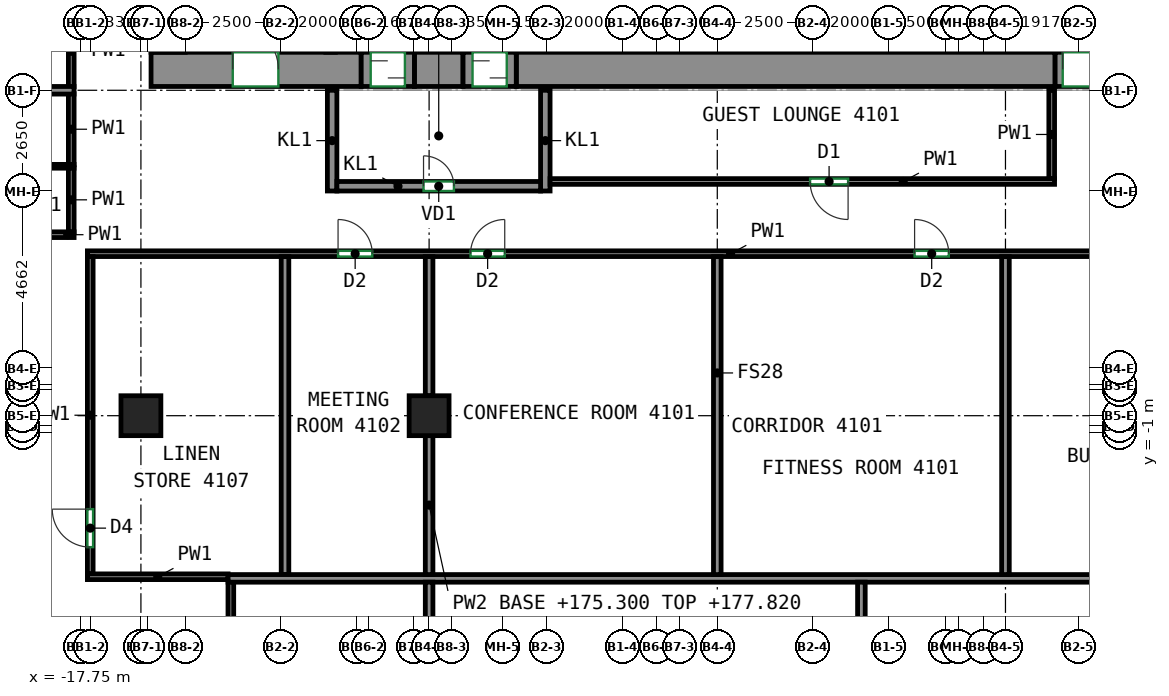
"""IFC4 building model, lengths in metres.
Left out: names, types, materials, properties, quantities, classifications, styles, units other than length and angle.
Written with IfcOpenShell. Run it as: python <this file> out.ifc"""

import sys

from ifc_helpers import new_model, si_unit, direction, frame, frame_2d, origin, origin_2d, place, context, subcontext, project, spatial, rectangle, extrude, source, transform, mapped, element, fill, save


model = new_model("IFC4")
c1 = context("Model", 3, precision=1e-05, world=origin(), true_north=direction((0.0, 1.0)))
c2 = subcontext(c1, "Body", "Model", "MODEL_VIEW")
j1 = project(units=[si_unit("LENGTHUNIT", "METRE"), si_unit("PLANEANGLEUNIT", "RADIAN")], contexts=[c1])
p1 = place(None, origin())
s1 = spatial("IfcSite", under=j1, at=p1, CompositionType="ELEMENT")
p2 = place(p1, origin())
s2 = spatial("IfcBuilding", under=s1, at=p2, CompositionType="ELEMENT")
p3 = place(p2, frame((0.0, 0.0, 175.3)))
s3 = spatial("IfcBuildingStorey", under=s2, at=p3, CompositionType="ELEMENT", Elevation=175.3)
m1 = source(origin(), c2, "Body", "SweptSolid", [
    extrude(rectangle(XDim=1.05, YDim=1.05, at=origin_2d()), origin(), (0.0, 0.0, 1.0), 3.12),
])
for number, where, z_axis, x_axis in (
    (1, (-16.167, -0.562, 0.0), (0.0, 0.0, 1.0), (1.0, 0.0, 0.0)),
    (2, (-8.583, -0.562, 0.0), (0.0, 0.0, 1.0), (1.0, 0.0, 0.0)),
):
    element("IfcColumn", number, at=place(p3, frame(where, z_axis=z_axis, x_axis=x_axis)), inside=s3, PredefinedType="COLUMN", context=c2, shape_type="MappedRepresentation", body=[
        mapped(m1, transform((0.0, 0.0, 0.0))),
    ])
m2 = source(origin(), c2, "Body", "SweptSolid", [
    extrude(rectangle(XDim=5.53, YDim=0.9, at=frame_2d((2.765, 0.0))), origin(), (0.0, 0.0, 1.0), 3.12),
])
p4 = place(p3, frame((-15.9, 8.55, 0.0), z_axis=(0.0, 0.0, 1.0), x_axis=(1.0, 0.0, 0.0)))
e3 = element("IfcWall", 3, at=p4, inside=s3, PredefinedType="SHEAR", context=c2, shape_type="MappedRepresentation", body=[
    mapped(m2, transform((0.0, 0.0, 0.0))),
])
p5 = place(p4, frame((2.15, 0.0, 0.0)))
e4 = element("IfcOpeningElement", 4, at=p5, cuts=e3, PredefinedType="OPENING", context=c2, shape_type="SweptSolid", body=[
    extrude(rectangle(XDim=1.2, YDim=2.1, at=frame_2d((0.6, 1.05))), frame((0.0, 0.46, 0.0), z_axis=(0.0, -1.0, 0.0), x_axis=(1.0, 0.0, 0.0)), (0.0, 0.0, 1.0), 0.92),
])
m3 = source(origin(), c2, "Body", "SweptSolid", [
    extrude(rectangle(XDim=1.28, YDim=0.9, at=frame_2d((0.64, 0.0))), origin(), (0.0, 0.0, 1.0), 3.12),
])
p6 = place(p3, frame((-8.97, 8.55, 0.0), z_axis=(0.0, 0.0, 1.0), x_axis=(1.0, 0.0, 0.0)))
e5 = element("IfcWall", 5, at=p6, inside=s3, PredefinedType="SHEAR", context=c2, shape_type="MappedRepresentation", body=[
    mapped(m3, transform((0.0, 0.0, 0.0))),
])
m4 = source(origin(), c2, "Body", "SweptSolid", [
    extrude(rectangle(XDim=14.18, YDim=0.9, at=frame_2d((7.09, 0.0))), origin(), (0.0, 0.0, 1.0), 3.12),
])
p7 = place(p3, frame((-6.29, 8.55, 0.0), z_axis=(0.0, 0.0, 1.0), x_axis=(1.0, 0.0, 0.0)))
e6 = element("IfcWall", 6, at=p7, inside=s3, PredefinedType="SHEAR", context=c2, shape_type="MappedRepresentation", body=[
    mapped(m4, transform((0.0, 0.0, 0.0))),
])
m5 = source(origin(), c2, "Body", "SweptSolid", [
    extrude(rectangle(XDim=2.65, YDim=0.25, at=frame_2d((1.325, 0.0))), origin(), (0.0, 0.0, 1.0), 3.12),
])
for number, where, z_axis, x_axis in (
    (7, (-11.135, 5.35, 0.0), (0.0, 0.0, 1.0), (0.0, 1.0, 0.0)),
    (8, (-5.525, 5.35, 0.0), (0.0, 0.0, 1.0), (0.0, 1.0, 0.0)),
):
    element("IfcWall", number, at=place(p3, frame(where, z_axis=z_axis, x_axis=x_axis)), inside=s3, PredefinedType="PARTITIONING", context=c2, shape_type="MappedRepresentation", body=[
        mapped(m5, transform((0.0, 0.0, 0.0))),
    ])
m6 = source(origin(), c2, "Body", "SweptSolid", [
    extrude(rectangle(XDim=5.36, YDim=0.25, at=frame_2d((2.68, 0.0))), origin(), (0.0, 0.0, 1.0), 3.12),
])
p8 = place(p3, frame((-11.01, 5.475, 0.0), z_axis=(0.0, 0.0, 1.0), x_axis=(1.0, 0.0, 0.0)))
e9 = element("IfcWall", 9, at=p8, inside=s3, PredefinedType="PARTITIONING", context=c2, shape_type="MappedRepresentation", body=[
    mapped(m6, transform((0.0, 0.0, 0.0))),
])
p9 = place(p8, frame((2.28, 0.0, 0.0)))
e10 = element("IfcOpeningElement", 10, at=p9, cuts=e9, PredefinedType="OPENING", context=c2, shape_type="SweptSolid", body=[
    extrude(rectangle(XDim=0.8, YDim=2.0, at=frame_2d((0.4, 1.0))), frame((0.0, 0.135, 0.0), z_axis=(0.0, -1.0, 0.0), x_axis=(1.0, 0.0, 0.0)), (0.0, 0.0, 1.0), 0.27),
])
m7 = source(origin(), c2, "Body", "SweptSolid", [
    extrude(rectangle(XDim=1.4, YDim=0.9, at=frame_2d((0.7, 0.0))), origin(), (0.0, 0.0, 1.0), 2.7),
])
p10 = place(p3, frame((-10.37, 8.55, 0.0), z_axis=(0.0, 0.0, 1.0), x_axis=(1.0, 0.0, 0.0)))
e11 = element("IfcWall", 11, at=p10, inside=s3, PredefinedType="PARTITIONING", context=c2, shape_type="MappedRepresentation", body=[
    mapped(m7, transform((0.0, 0.0, 0.0))),
])
p11 = place(p10, frame((0.25, 0.0, 0.0)))
e12 = element("IfcOpeningElement", 12, at=p11, cuts=e11, PredefinedType="OPENING", context=c2, shape_type="SweptSolid", body=[
    extrude(rectangle(XDim=0.9, YDim=2.1, at=frame_2d((0.45, 1.05))), frame((0.0, 0.46, 0.0), z_axis=(0.0, -1.0, 0.0), x_axis=(1.0, 0.0, 0.0)), (0.0, 0.0, 1.0), 0.92),
])
m8 = source(origin(), c2, "Body", "SweptSolid", [
    extrude(rectangle(XDim=1.4, YDim=0.9, at=frame_2d((0.7, 0.0))), origin(), (0.0, 0.0, 1.0), 2.7),
])
p12 = place(p3, frame((-7.69, 8.55, 0.0), z_axis=(0.0, 0.0, 1.0), x_axis=(1.0, 0.0, 0.0)))
e13 = element("IfcWall", 13, at=p12, inside=s3, PredefinedType="PARTITIONING", context=c2, shape_type="MappedRepresentation", body=[
    mapped(m8, transform((0.0, 0.0, 0.0))),
])
p13 = place(p12, frame((0.25, 0.0, 0.0)))
e14 = element("IfcOpeningElement", 14, at=p13, cuts=e13, PredefinedType="OPENING", context=c2, shape_type="SweptSolid", body=[
    extrude(rectangle(XDim=0.9, YDim=2.1, at=frame_2d((0.45, 1.05))), frame((0.0, 0.46, 0.0), z_axis=(0.0, -1.0, 0.0), x_axis=(1.0, 0.0, 0.0)), (0.0, 0.0, 1.0), 0.92),
])
m9 = source(origin(), c2, "Body", "SweptSolid", [
    extrude(rectangle(XDim=2.4, YDim=0.9, at=frame_2d((1.2, 0.0))), origin(), (0.0, 0.0, 1.0), 2.7),
])
p14 = place(p3, frame((7.89, 8.55, 0.0), z_axis=(0.0, 0.0, 1.0), x_axis=(1.0, 0.0, 0.0)))
e15 = element("IfcWall", 15, at=p14, inside=s3, PredefinedType="PARTITIONING", context=c2, shape_type="MappedRepresentation", body=[
    mapped(m9, transform((0.0, 0.0, 0.0))),
])
p15 = place(p14, frame((0.2, 0.0, 0.0)))
e16 = element("IfcOpeningElement", 16, at=p15, cuts=e15, PredefinedType="OPENING", context=c2, shape_type="SweptSolid", body=[
    extrude(rectangle(XDim=2.0, YDim=2.1, at=frame_2d((1.0, 1.05))), frame((0.0, 0.46, 0.0), z_axis=(0.0, -1.0, 0.0), x_axis=(1.0, 0.0, 0.0)), (0.0, 0.0, 1.0), 0.92),
])
p16 = place(p3, frame((-17.925, 4.2, 0.0), z_axis=(0.0, 0.0, 1.0), x_axis=(-1.0, 0.0, 0.0)))
e17 = element("IfcWall", 17, at=p16, inside=s3, PredefinedType="PARTITIONING", context=c2, shape_type="SweptSolid", body=[
    extrude(rectangle(XDim=2.109, YDim=0.15, at=frame_2d((1.054, 0.0))), origin(), (0.0, 0.0, 1.0), 3.12),
])
p17 = place(p16, frame((0.706, 0.0, 0.0)))
e18 = element("IfcOpeningElement", 18, at=p17, cuts=e17, PredefinedType="OPENING", context=c2, shape_type="SweptSolid", body=[
    extrude(rectangle(XDim=1.0, YDim=2.1, at=frame_2d((0.5, 1.05))), frame((0.0, 0.085, 0.0), z_axis=(0.0, -1.0, 0.0), x_axis=(1.0, 0.0, 0.0)), (0.0, 0.0, 1.0), 0.17),
])
p18 = place(p3, frame((-18.0, 4.275, 0.0), z_axis=(0.0, 0.0, 1.0), x_axis=(0.0, 1.0, 0.0)))
e19 = element("IfcWall", 19, at=p18, inside=s3, PredefinedType="PARTITIONING", context=c2, shape_type="SweptSolid", body=[
    extrude(rectangle(XDim=1.685, YDim=0.15, at=frame_2d((0.843, 0.0))), origin(), (0.0, 0.0, 1.0), 3.12),
])
for number, where, z_axis, x_axis in (
    (20, (-18.0, 6.04, 0.0), (0.0, 0.0, 1.0), (0.0, 1.0, 0.0)),
    (21, (-18.0, 8.09, 0.0), (0.0, 0.0, 1.0), (0.0, 1.0, 0.0)),
):
    element("IfcWall", number, at=place(p3, frame(where, z_axis=z_axis, x_axis=x_axis)), inside=s3, PredefinedType="PARTITIONING", context=c2, shape_type="SweptSolid", body=[
        extrude(rectangle(XDim=1.87, YDim=0.15, at=frame_2d((0.935, 0.0))), origin(), (0.0, 0.0, 1.0), 3.12),
    ])
p19 = place(p3, frame((7.875, 5.6, 0.0), z_axis=(0.0, 0.0, 1.0), x_axis=(-1.0, 0.0, 0.0)))
e22 = element("IfcWall", 22, at=p19, inside=s3, PredefinedType="PARTITIONING", context=c2, shape_type="SweptSolid", body=[
    extrude(rectangle(XDim=13.275, YDim=0.15, at=frame_2d((6.637, 0.0))), origin(), (0.0, 0.0, 1.0), 3.12),
])
p20 = place(p19, frame((5.433, 0.0, 0.0)))
e23 = element("IfcOpeningElement", 23, at=p20, cuts=e22, PredefinedType="OPENING", context=c2, shape_type="SweptSolid", body=[
    extrude(rectangle(XDim=1.0, YDim=2.1, at=frame_2d((0.5, 1.05))), frame((0.0, 0.085, 0.0), z_axis=(0.0, -1.0, 0.0), x_axis=(1.0, 0.0, 0.0)), (0.0, 0.0, 1.0), 0.17),
])
p21 = place(p3, frame((7.8, 8.0, 0.0), z_axis=(0.0, 0.0, 1.0), x_axis=(0.0, -1.0, 0.0)))
e24 = element("IfcWall", 24, at=p21, inside=s3, PredefinedType="PARTITIONING", context=c2, shape_type="SweptSolid", body=[
    extrude(rectangle(XDim=2.325, YDim=0.15, at=frame_2d((1.163, 0.0))), origin(), (0.0, 0.0, 1.0), 3.12),
])
p22 = place(p3, frame((-17.575, 3.7, 0.0), z_axis=(0.0, 0.0, 1.0), x_axis=(1.0, 0.0, 0.0)))
e25 = element("IfcWall", 25, at=p22, inside=s3, PredefinedType="PARTITIONING", context=c2, shape_type="SweptSolid", body=[
    extrude(rectangle(XDim=33.85, YDim=0.15, at=frame_2d((16.925, 0.0))), origin(), (0.0, 0.0, 1.0), 3.12),
])
p23 = place(p22, frame((6.596, 0.0, 0.0)))
e26 = element("IfcOpeningElement", 26, at=p23, cuts=e25, PredefinedType="OPENING", context=c2, shape_type="SweptSolid", body=[
    extrude(rectangle(XDim=0.9, YDim=2.1, at=frame_2d((0.45, 1.05))), frame((0.0, 0.085, 0.0), z_axis=(0.0, -1.0, 0.0), x_axis=(1.0, 0.0, 0.0)), (0.0, 0.0, 1.0), 0.17),
])
p24 = place(p22, frame((10.082, 0.0, 0.0)))
e27 = element("IfcOpeningElement", 27, at=p24, cuts=e25, PredefinedType="OPENING", context=c2, shape_type="SweptSolid", body=[
    extrude(rectangle(XDim=0.9, YDim=2.1, at=frame_2d((0.45, 1.05))), frame((0.0, 0.085, 0.0), z_axis=(0.0, -1.0, 0.0), x_axis=(1.0, 0.0, 0.0)), (0.0, 0.0, 1.0), 0.17),
])
p25 = place(p22, frame((21.767, 0.0, 0.0)))
e28 = element("IfcOpeningElement", 28, at=p25, cuts=e25, PredefinedType="OPENING", context=c2, shape_type="SweptSolid", body=[
    extrude(rectangle(XDim=0.9, YDim=2.1, at=frame_2d((0.45, 1.05))), frame((0.0, 0.085, 0.0), z_axis=(0.0, -1.0, 0.0), x_axis=(1.0, 0.0, 0.0)), (0.0, 0.0, 1.0), 0.17),
])
p26 = place(p22, frame((29.649, 0.0, 0.0)))
e29 = element("IfcOpeningElement", 29, at=p26, cuts=e25, PredefinedType="OPENING", context=c2, shape_type="SweptSolid", body=[
    extrude(rectangle(XDim=0.9, YDim=2.1, at=frame_2d((0.45, 1.05))), frame((0.0, 0.085, 0.0), z_axis=(0.0, -1.0, 0.0), x_axis=(1.0, 0.0, 0.0)), (0.0, 0.0, 1.0), 0.17),
])
p27 = place(p3, frame((-17.5, -4.725, 0.0), z_axis=(0.0, 0.0, 1.0), x_axis=(0.0, 1.0, 0.0)))
e30 = element("IfcWall", 30, at=p27, inside=s3, PredefinedType="PARTITIONING", context=c2, shape_type="SweptSolid", body=[
    extrude(rectangle(XDim=8.35, YDim=0.15, at=frame_2d((4.175, 0.0))), origin(), (0.0, 0.0, 1.0), 3.12),
])
p28 = place(p27, frame((0.704, 0.0, 0.0)))
e31 = element("IfcOpeningElement", 31, at=p28, cuts=e30, PredefinedType="OPENING", context=c2, shape_type="SweptSolid", body=[
    extrude(rectangle(XDim=1.0, YDim=2.1, at=frame_2d((0.5, 1.05))), frame((0.0, 0.085, 0.0), z_axis=(0.0, -1.0, 0.0), x_axis=(1.0, 0.0, 0.0)), (0.0, 0.0, 1.0), 0.17),
])
p29 = place(p3, frame((-17.575, -4.8, 0.0), z_axis=(0.0, 0.0, 1.0), x_axis=(1.0, 0.0, 0.0)))
e32 = element("IfcWall", 32, at=p29, inside=s3, PredefinedType="PARTITIONING", context=c2, shape_type="SweptSolid", body=[
    extrude(rectangle(XDim=3.702, YDim=0.15, at=frame_2d((1.851, 0.0))), origin(), (0.0, 0.0, 1.0), 3.12),
])
p30 = place(p3, frame((-13.8, -7.75, 0.0), z_axis=(0.0, 0.0, 1.0), x_axis=(0.0, 1.0, 0.0)))
e33 = element("IfcWall", 33, at=p30, inside=s3, PredefinedType="PARTITIONING", context=c2, shape_type="SweptSolid", body=[
    extrude(rectangle(XDim=2.817, YDim=0.15, at=frame_2d((1.408, 0.0))), origin(), (0.0, 0.0, 1.0), 3.12),
])
p31 = place(p3, frame((-17.927, 6.0, 0.0), z_axis=(0.0, 0.0, 1.0), x_axis=(-1.0, 0.0, 0.0)))
e34 = element("IfcWall", 34, at=p31, inside=s3, PredefinedType="PARTITIONING", context=c2, shape_type="SweptSolid", body=[
    extrude(rectangle(XDim=2.825, YDim=0.1, at=frame_2d((1.413, 0.0))), origin(), (0.0, 0.0, 1.0), 3.12),
])
p32 = place(p31, frame((1.522, 0.0, 0.0)))
e35 = element("IfcOpeningElement", 35, at=p32, cuts=e34, PredefinedType="OPENING", context=c2, shape_type="SweptSolid", body=[
    extrude(rectangle(XDim=0.9, YDim=2.1, at=frame_2d((0.45, 1.05))), frame((0.0, 0.06, 0.0), z_axis=(0.0, -1.0, 0.0), x_axis=(1.0, 0.0, 0.0)), (0.0, 0.0, 1.0), 0.12),
])
p33 = place(p3, frame((-26.4, 8.0, 0.0), z_axis=(0.0, 0.0, 1.0), x_axis=(1.0, 0.0, 0.0)))
e36 = element("IfcWall", 36, at=p33, inside=s3, PredefinedType="PARTITIONING", context=c2, shape_type="SweptSolid", body=[
    extrude(rectangle(XDim=8.473, YDim=0.2, at=frame_2d((4.236, 0.0))), origin(), (0.0, 0.0, 1.0), 3.12),
])
p34 = place(p3, frame((-12.375, -4.743, 0.0), z_axis=(0.0, 0.0, 1.0), x_axis=(0.0, 1.0, 0.0)))
e37 = element("IfcWall", 37, at=p34, inside=s3, PredefinedType="PARTITIONING", context=c2, shape_type="SweptSolid", body=[
    extrude(rectangle(XDim=8.366, YDim=0.2, at=frame_2d((4.183, 0.0))), origin(), (0.0, 0.0, 1.0), 3.12),
])
p35 = place(p3, frame((-13.873, -4.843, 0.0), z_axis=(0.0, 0.0, 1.0), x_axis=(1.0, 0.0, 0.0)))
e38 = element("IfcWall", 38, at=p35, inside=s3, PredefinedType="PARTITIONING", context=c2, shape_type="SweptSolid", body=[
    extrude(rectangle(XDim=30.146, YDim=0.2, at=frame_2d((15.073, 0.0))), origin(), (0.0, 0.0, 1.0), 3.12),
])
p36 = place(p3, frame((-8.583, -0.037, 0.0), z_axis=(0.0, 0.0, 1.0), x_axis=(0.0, 1.0, 0.0)))
e39 = element("IfcWall", 39, at=p36, inside=s3, PredefinedType="PARTITIONING", context=c2, shape_type="SweptSolid", body=[
    extrude(rectangle(XDim=3.66, YDim=0.2, at=frame_2d((1.83, 0.0))), origin(), (0.0, 0.0, 1.0), 3.12),
])
p37 = place(p3, frame((-8.583, -4.743, 0.0), z_axis=(0.0, 0.0, 1.0), x_axis=(0.0, 1.0, 0.0)))
e40 = element("IfcWall", 40, at=p37, inside=s3, PredefinedType="PARTITIONING", context=c2, shape_type="SweptSolid", body=[
    extrude(rectangle(XDim=3.656, YDim=0.2, at=frame_2d((1.828, 0.0))), origin(), (0.0, 0.0, 1.0), 2.52),
])
for number, where, z_axis, x_axis in (
    (41, (-1.0, -4.743, 0.0), (0.0, 0.0, 1.0), (0.0, 1.0, 0.0)),
    (42, (6.583, -4.743, 0.0), (0.0, 0.0, 1.0), (0.0, 1.0, 0.0)),
):
    element("IfcWall", number, at=place(p3, frame(where, z_axis=z_axis, x_axis=x_axis)), inside=s3, PredefinedType="PARTITIONING", context=c2, shape_type="SweptSolid", body=[
        extrude(rectangle(XDim=8.366, YDim=0.2, at=frame_2d((4.183, 0.0))), origin(), (0.0, 0.0, 1.0), 3.12),
    ])
p38 = place(p3, frame((-8.583, -8.6, 0.0), z_axis=(0.0, 0.0, 1.0), x_axis=(0.0, 1.0, 0.0)))
e43 = element("IfcWall", 43, at=p38, inside=s3, PredefinedType="PARTITIONING", context=c2, shape_type="SweptSolid", body=[
    extrude(rectangle(XDim=3.657, YDim=0.2, at=frame_2d((1.829, 0.0))), origin(), (0.0, 0.0, 1.0), 2.52),
])
p39 = place(p3, frame((2.792, -15.423, 0.0), z_axis=(0.0, 0.0, 1.0), x_axis=(0.0, 1.0, 0.0)))
e44 = element("IfcWall", 44, at=p39, inside=s3, PredefinedType="PARTITIONING", context=c2, shape_type="SweptSolid", body=[
    extrude(rectangle(XDim=10.48, YDim=0.2, at=frame_2d((5.24, 0.0))), origin(), (0.0, 0.0, 1.0), 3.12),
])
p40 = place(p15, origin())
e45 = element("IfcDoor", 45, at=p40, inside=s3, OperationType="DOUBLE_DOOR_SINGLE_SWING", PredefinedType="DOOR", context=c2, shape_type="SweptSolid", body=[
    extrude(rectangle(XDim=2.0, YDim=2.1, at=frame_2d((1.0, 1.05))), frame((0.0, 0.355, 0.0), z_axis=(0.0, -1.0, 0.0), x_axis=(1.0, 0.0, 0.0)), (0.0, 0.0, 1.0), 0.05),
])
fill(e16, e45)
p41 = place(p9, origin())
e46 = element("IfcDoor", 46, at=p41, inside=s3, OperationType="SINGLE_SWING_LEFT", PredefinedType="DOOR", context=c2, shape_type="SweptSolid", body=[
    extrude(rectangle(XDim=0.8, YDim=2.0, at=frame_2d((0.4, 1.0))), frame((0.0, 0.025, 0.0), z_axis=(0.0, -1.0, 0.0), x_axis=(1.0, 0.0, 0.0)), (0.0, 0.0, 1.0), 0.05),
])
fill(e10, e46)
p42 = place(p11, origin())
e47 = element("IfcDoor", 47, at=p42, inside=s3, OperationType="SLIDING_TO_LEFT", PredefinedType="DOOR", context=c2, shape_type="SweptSolid", body=[
    extrude(rectangle(XDim=0.9, YDim=2.1, at=frame_2d((0.45, 1.05))), frame((0.0, 0.355, 0.0), z_axis=(0.0, -1.0, 0.0), x_axis=(1.0, 0.0, 0.0)), (0.0, 0.0, 1.0), 0.05),
])
fill(e12, e47)
p43 = place(p13, origin())
e48 = element("IfcDoor", 48, at=p43, inside=s3, OperationType="SLIDING_TO_RIGHT", PredefinedType="DOOR", context=c2, shape_type="SweptSolid", body=[
    extrude(rectangle(XDim=0.9, YDim=2.1, at=frame_2d((0.45, 1.05))), frame((0.0, 0.355, 0.0), z_axis=(0.0, -1.0, 0.0), x_axis=(1.0, 0.0, 0.0)), (0.0, 0.0, 1.0), 0.05),
])
fill(e14, e48)
p44 = place(p5, origin())
e49 = element("IfcDoor", 49, at=p44, inside=s3, OperationType="DOUBLE_DOOR_SINGLE_SWING", PredefinedType="DOOR", context=c2, shape_type="SweptSolid", body=[
    extrude(rectangle(XDim=1.2, YDim=2.1, at=frame_2d((0.6, 1.05))), frame((0.0, 0.355, 0.0), z_axis=(0.0, -1.0, 0.0), x_axis=(1.0, 0.0, 0.0)), (0.0, 0.0, 1.0), 0.05),
])
fill(e4, e49)
p45 = place(p28, origin())
e50 = element("IfcDoor", 50, at=p45, inside=s3, OperationType="SINGLE_SWING_RIGHT", PredefinedType="DOOR", context=c2, shape_type="SweptSolid", body=[
    extrude(rectangle(XDim=1.0, YDim=2.1, at=frame_2d((0.5, 1.05))), frame((0.0, 0.025, 0.0), z_axis=(0.0, -1.0, 0.0), x_axis=(1.0, 0.0, 0.0)), (0.0, 0.0, 1.0), 0.05),
])
fill(e31, e50)
p46 = place(p23, origin())
e51 = element("IfcDoor", 51, at=p46, inside=s3, OperationType="SINGLE_SWING_LEFT", PredefinedType="DOOR", context=c2, shape_type="SweptSolid", body=[
    extrude(rectangle(XDim=0.9, YDim=2.1, at=frame_2d((0.45, 1.05))), frame((0.0, 0.025, 0.0), z_axis=(0.0, -1.0, 0.0), x_axis=(1.0, 0.0, 0.0)), (0.0, 0.0, 1.0), 0.05),
])
fill(e26, e51)
p47 = place(p24, origin())
e52 = element("IfcDoor", 52, at=p47, inside=s3, OperationType="SINGLE_SWING_RIGHT", PredefinedType="DOOR", context=c2, shape_type="SweptSolid", body=[
    extrude(rectangle(XDim=0.9, YDim=2.1, at=frame_2d((0.45, 1.05))), frame((0.0, 0.025, 0.0), z_axis=(0.0, -1.0, 0.0), x_axis=(1.0, 0.0, 0.0)), (0.0, 0.0, 1.0), 0.05),
])
fill(e27, e52)
p48 = place(p25, origin())
e53 = element("IfcDoor", 53, at=p48, inside=s3, OperationType="SINGLE_SWING_LEFT", PredefinedType="DOOR", context=c2, shape_type="SweptSolid", body=[
    extrude(rectangle(XDim=0.9, YDim=2.1, at=frame_2d((0.45, 1.05))), frame((0.0, 0.025, 0.0), z_axis=(0.0, -1.0, 0.0), x_axis=(1.0, 0.0, 0.0)), (0.0, 0.0, 1.0), 0.05),
])
fill(e28, e53)
p49 = place(p20, origin())
e54 = element("IfcDoor", 54, at=p49, inside=s3, OperationType="SINGLE_SWING_LEFT", PredefinedType="DOOR", context=c2, shape_type="SweptSolid", body=[
    extrude(rectangle(XDim=1.0, YDim=2.1, at=frame_2d((0.5, 1.05))), frame((0.0, 0.025, 0.0), z_axis=(0.0, -1.0, 0.0), x_axis=(1.0, 0.0, 0.0)), (0.0, 0.0, 1.0), 0.05),
])
fill(e23, e54)
save(model, sys.argv[1])
